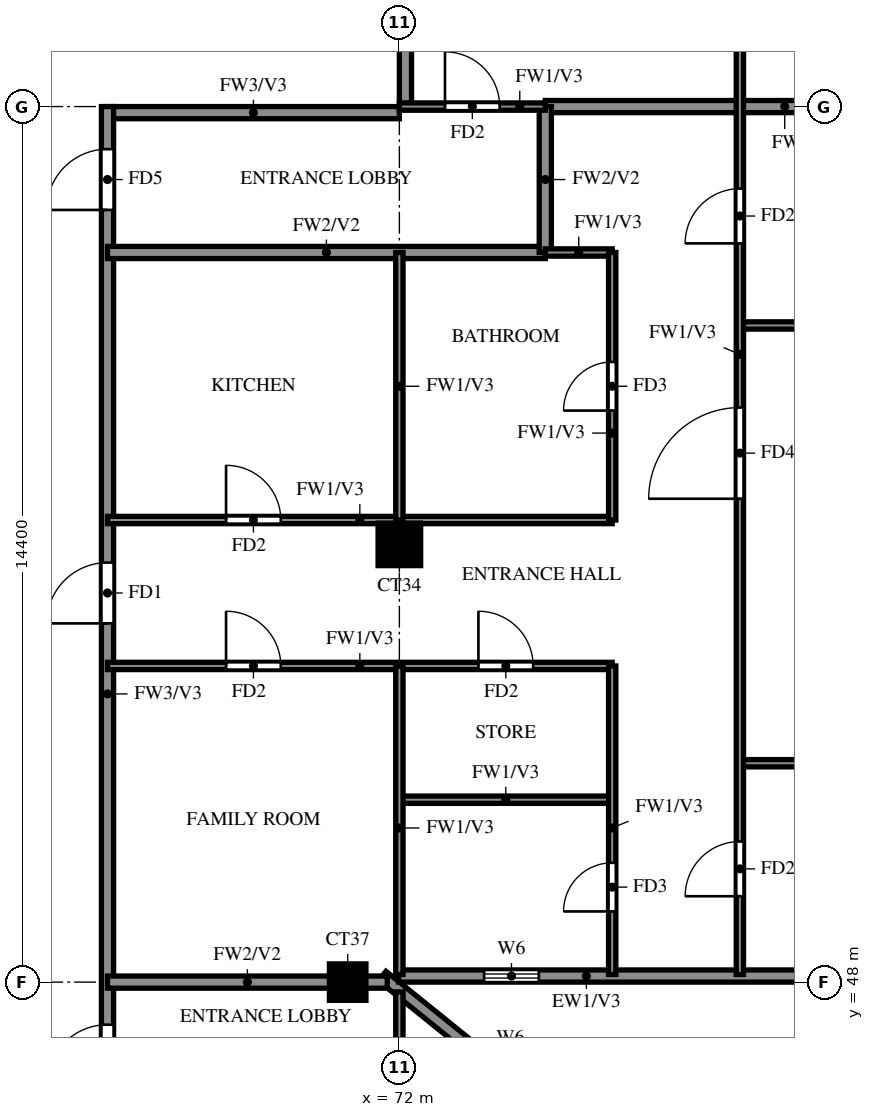
"""IFC4 building model, lengths in metres.
Left out: names, types, materials, properties, quantities, classifications, styles, units other than length and angle.
Written with IfcOpenShell. Run it as: python <this file> out.ifc"""

import sys

from ifc_helpers import new_model, si_unit, direction, frame, frame_2d, origin, origin_2d, place, context, subcontext, project, spatial, rectangle, extrude, source, transform, mapped, element, fill, save


model = new_model("IFC4")
c1 = context("Model", 3, precision=1e-05, world=origin(), true_north=direction((0.0, 1.0)))
c2 = subcontext(c1, "Body", "Model", "MODEL_VIEW")
j1 = project(units=[si_unit("LENGTHUNIT", "METRE"), si_unit("PLANEANGLEUNIT", "RADIAN")], contexts=[c1])
p1 = place(None, origin())
s1 = spatial("IfcSite", under=j1, at=p1, CompositionType="ELEMENT")
p2 = place(p1, origin())
s2 = spatial("IfcBuilding", under=s1, at=p2, CompositionType="ELEMENT")
p3 = place(p2, frame((0.0, 0.0, 264.0)))
s3 = spatial("IfcBuildingStorey", under=s2, at=p3, CompositionType="ELEMENT", Elevation=264.0)
m1 = source(origin(), c2, "Body", "SweptSolid", [
    extrude(rectangle(XDim=0.6, YDim=0.6, at=origin_2d()), origin(), (0.0, 0.0, 1.0), 3.22),
])
p4 = place(p3, frame((71.15, 48.0, 0.0), z_axis=(0.0, 0.0, 1.0), x_axis=(1.0, 0.0, 0.0)))
e1 = element("IfcColumn", 1, at=p4, inside=s3, PredefinedType="COLUMN", context=c2, shape_type="MappedRepresentation", body=[
    mapped(m1, transform((0.0, 0.0, 0.0))),
])
m2 = source(origin(), c2, "Body", "SweptSolid", [
    extrude(rectangle(XDim=0.7, YDim=0.7, at=origin_2d()), origin(), (0.0, 0.0, 1.0), 3.22),
])
p5 = place(p3, frame((72.0, 55.2, 0.0), z_axis=(0.0, 0.0, 1.0), x_axis=(1.0, 0.0, 0.0)))
e2 = element("IfcColumn", 2, at=p5, inside=s3, PredefinedType="COLUMN", context=c2, shape_type="MappedRepresentation", body=[
    mapped(m2, transform((0.0, 0.0, 0.0))),
])
p6 = place(p3, frame((81.907, 39.87, 0.0), z_axis=(0.0, 0.0, 1.0), x_axis=(-0.777936274417, 0.62834318087, 0.0)))
e3 = element("IfcWall", 3, at=p6, inside=s3, PredefinedType="SOLIDWALL", context=c2, shape_type="SweptSolid", body=[
    extrude(rectangle(XDim=13.099, YDim=0.2, at=frame_2d((6.549, 0.0))), origin(), (0.0, 0.0, 1.0), 3.22),
])
p7 = place(p6, frame((9.938, 0.0, 1.5)))
e4 = element("IfcOpeningElement", 4, at=p7, cuts=e3, PredefinedType="OPENING", context=c2, shape_type="SweptSolid", body=[
    extrude(rectangle(XDim=0.9, YDim=0.9, at=frame_2d((0.45, 0.45))), frame((0.0, 0.11, 0.0), z_axis=(0.0, -1.0, 0.0), x_axis=(1.0, 0.0, 0.0)), (0.0, 0.0, 1.0), 0.22),
])
p8 = place(p3, frame((71.987, 48.1, 0.0), z_axis=(0.0, 0.0, 1.0), x_axis=(1.0, 0.0, 0.0)))
e5 = element("IfcWall", 5, at=p8, inside=s3, PredefinedType="SOLIDWALL", context=c2, shape_type="SweptSolid", body=[
    extrude(rectangle(XDim=6.863, YDim=0.2, at=frame_2d((3.432, 0.0))), origin(), (0.0, 0.0, 1.0), 3.22),
])
p9 = place(p8, frame((1.406, 0.0, 1.5)))
e6 = element("IfcOpeningElement", 6, at=p9, cuts=e5, PredefinedType="OPENING", context=c2, shape_type="SweptSolid", body=[
    extrude(rectangle(XDim=0.9, YDim=0.9, at=frame_2d((0.45, 0.45))), frame((0.0, 0.11, 0.0), z_axis=(0.0, -1.0, 0.0), x_axis=(1.0, 0.0, 0.0)), (0.0, 0.0, 1.0), 0.22),
])
p10 = place(p3, frame((67.2, 62.3, 0.0), z_axis=(0.0, 0.0, 1.0), x_axis=(1.0, 0.0, 0.0)))
e7 = element("IfcWall", 7, at=p10, inside=s3, PredefinedType="SOLIDWALL", context=c2, shape_type="SweptSolid", body=[
    extrude(rectangle(XDim=4.8, YDim=0.2, at=frame_2d((2.4, 0.0))), origin(), (0.0, 0.0, 1.0), 3.22),
])
p11 = place(p3, frame((67.2, 45.6, 0.0), z_axis=(0.0, 0.0, 1.0), x_axis=(0.0, 1.0, 0.0)))
e8 = element("IfcWall", 8, at=p11, inside=s3, PredefinedType="SOLIDWALL", context=c2, shape_type="SweptSolid", body=[
    extrude(rectangle(XDim=16.8, YDim=0.2, at=frame_2d((8.4, 0.0))), origin(), (0.0, 0.0, 1.0), 3.22),
])
p12 = place(p11, frame((8.3, 0.0, 0.0)))
e9 = element("IfcOpeningElement", 9, at=p12, cuts=e8, PredefinedType="OPENING", context=c2, shape_type="SweptSolid", body=[
    extrude(rectangle(XDim=1.0, YDim=2.1, at=frame_2d((0.5, 1.05))), frame((0.0, 0.11, 0.0), z_axis=(0.0, -1.0, 0.0), x_axis=(1.0, 0.0, 0.0)), (0.0, 0.0, 1.0), 0.22),
])
p13 = place(p11, frame((15.1, 0.0, 0.0)))
e10 = element("IfcOpeningElement", 10, at=p13, cuts=e8, PredefinedType="OPENING", context=c2, shape_type="SweptSolid", body=[
    extrude(rectangle(XDim=1.0, YDim=2.1, at=frame_2d((0.5, 1.05))), frame((0.0, 0.11, 0.0), z_axis=(0.0, -1.0, 0.0), x_axis=(1.0, 0.0, 0.0)), (0.0, 0.0, 1.0), 0.22),
])
p14 = place(p11, frame((0.7, 0.0, 0.0)))
e11 = element("IfcOpeningElement", 11, at=p14, cuts=e8, PredefinedType="OPENING", context=c2, shape_type="SweptSolid", body=[
    extrude(rectangle(XDim=1.0, YDim=2.1, at=frame_2d((0.5, 1.05))), frame((0.0, 0.11, 0.0), z_axis=(0.0, -1.0, 0.0), x_axis=(1.0, 0.0, 0.0)), (0.0, 0.0, 1.0), 0.22),
])
p15 = place(p3, frame((72.1, 62.4, 0.0), z_axis=(0.0, 0.0, 1.0), x_axis=(0.0, 1.0, 0.0)))
e12 = element("IfcWall", 12, at=p15, inside=s3, PredefinedType="SOLIDWALL", context=c2, shape_type="SweptSolid", body=[
    extrude(rectangle(XDim=15.6, YDim=0.2, at=frame_2d((7.8, 0.0))), origin(), (0.0, 0.0, 1.0), 3.22),
])
p16 = place(p3, frame((67.2, 48.0, 0.0), z_axis=(0.0, 0.0, 1.0), x_axis=(1.0, 0.0, 0.0)))
e13 = element("IfcWall", 13, at=p16, inside=s3, PredefinedType="SOLIDWALL", context=c2, shape_type="SweptSolid", body=[
    extrude(rectangle(XDim=4.601, YDim=0.2, at=frame_2d((2.301, 0.0))), origin(), (0.0, 0.0, 1.0), 3.22),
])
p17 = place(p3, frame((67.2, 60.0, 0.0), z_axis=(0.0, 0.0, 1.0), x_axis=(1.0, 0.0, 0.0)))
e14 = element("IfcWall", 14, at=p17, inside=s3, PredefinedType="SOLIDWALL", context=c2, shape_type="SweptSolid", body=[
    extrude(rectangle(XDim=7.2, YDim=0.2, at=frame_2d((3.6, 0.0))), origin(), (0.0, 0.0, 1.0), 3.22),
])
p18 = place(p3, frame((74.4, 62.4, 0.0), z_axis=(0.0, 0.0, 1.0), x_axis=(1.0, 0.0, 0.0)))
e15 = element("IfcWall", 15, at=p18, inside=s3, PredefinedType="SOLIDWALL", context=c2, shape_type="SweptSolid", body=[
    extrude(rectangle(XDim=7.875, YDim=0.2, at=frame_2d((3.938, 0.0))), origin(), (0.0, 0.0, 1.0), 3.22),
])
p19 = place(p3, frame((74.4, 60.0, 0.0), z_axis=(0.0, 0.0, 1.0), x_axis=(0.0, 1.0, 0.0)))
e16 = element("IfcWall", 16, at=p19, inside=s3, PredefinedType="SOLIDWALL", context=c2, shape_type="SweptSolid", body=[
    extrude(rectangle(XDim=2.4, YDim=0.2, at=frame_2d((1.2, 0.0))), origin(), (0.0, 0.0, 1.0), 3.22),
])
p20 = place(p3, frame((72.0, 51.0, 0.0), z_axis=(0.0, 0.0, 1.0), x_axis=(1.0, 0.0, 0.0)))
e17 = element("IfcWall", 17, at=p20, inside=s3, PredefinedType="PARTITIONING", context=c2, shape_type="SweptSolid", body=[
    extrude(rectangle(XDim=3.5, YDim=0.12, at=frame_2d((1.75, 0.0))), origin(), (0.0, 0.0, 1.0), 3.22),
])
p21 = place(p3, frame((77.6, 51.6, 0.0), z_axis=(0.0, 0.0, 1.0), x_axis=(1.0, 0.0, 0.0)))
e18 = element("IfcWall", 18, at=p21, inside=s3, PredefinedType="PARTITIONING", context=c2, shape_type="SweptSolid", body=[
    extrude(rectangle(XDim=4.675, YDim=0.12, at=frame_2d((2.337, 0.0))), origin(), (0.0, 0.0, 1.0), 2.32),
])
p22 = place(p3, frame((67.2, 53.2, 0.0), z_axis=(0.0, 0.0, 1.0), x_axis=(1.0, 0.0, 0.0)))
e19 = element("IfcWall", 19, at=p22, inside=s3, PredefinedType="PARTITIONING", context=c2, shape_type="SweptSolid", body=[
    extrude(rectangle(XDim=8.3, YDim=0.12, at=frame_2d((4.15, 0.0))), origin(), (0.0, 0.0, 1.0), 3.22),
])
p23 = place(p22, frame((6.1, 0.0, 0.0)))
e20 = element("IfcOpeningElement", 20, at=p23, cuts=e19, PredefinedType="OPENING", context=c2, shape_type="SweptSolid", body=[
    extrude(rectangle(XDim=0.9, YDim=2.1, at=frame_2d((0.45, 1.05))), frame((0.0, 0.07, 0.0), z_axis=(0.0, -1.0, 0.0), x_axis=(1.0, 0.0, 0.0)), (0.0, 0.0, 1.0), 0.14),
])
p24 = place(p22, frame((1.95, 0.0, 0.0)))
e21 = element("IfcOpeningElement", 21, at=p24, cuts=e19, PredefinedType="OPENING", context=c2, shape_type="SweptSolid", body=[
    extrude(rectangle(XDim=0.9, YDim=2.1, at=frame_2d((0.45, 1.05))), frame((0.0, 0.07, 0.0), z_axis=(0.0, -1.0, 0.0), x_axis=(1.0, 0.0, 0.0)), (0.0, 0.0, 1.0), 0.14),
])
p25 = place(p3, frame((67.2, 55.6, 0.0), z_axis=(0.0, 0.0, 1.0), x_axis=(1.0, 0.0, 0.0)))
e22 = element("IfcWall", 22, at=p25, inside=s3, PredefinedType="PARTITIONING", context=c2, shape_type="SweptSolid", body=[
    extrude(rectangle(XDim=8.3, YDim=0.12, at=frame_2d((4.15, 0.0))), origin(), (0.0, 0.0, 1.0), 3.22),
])
p26 = place(p25, frame((1.95, 0.0, 0.0)))
e23 = element("IfcOpeningElement", 23, at=p26, cuts=e22, PredefinedType="OPENING", context=c2, shape_type="SweptSolid", body=[
    extrude(rectangle(XDim=0.9, YDim=2.1, at=frame_2d((0.45, 1.05))), frame((0.0, 0.07, 0.0), z_axis=(0.0, -1.0, 0.0), x_axis=(1.0, 0.0, 0.0)), (0.0, 0.0, 1.0), 0.14),
])
p27 = place(p3, frame((77.6, 58.8, 0.0), z_axis=(0.0, 0.0, 1.0), x_axis=(1.0, 0.0, 0.0)))
e24 = element("IfcWall", 24, at=p27, inside=s3, PredefinedType="PARTITIONING", context=c2, shape_type="SweptSolid", body=[
    extrude(rectangle(XDim=4.675, YDim=0.12, at=frame_2d((2.337, 0.0))), origin(), (0.0, 0.0, 1.0), 2.32),
])
p28 = place(p3, frame((74.4, 60.0, 0.0), z_axis=(0.0, 0.0, 1.0), x_axis=(1.0, 0.0, 0.0)))
e25 = element("IfcWall", 25, at=p28, inside=s3, PredefinedType="PARTITIONING", context=c2, shape_type="SweptSolid", body=[
    extrude(rectangle(XDim=1.1, YDim=0.12, at=frame_2d((0.55, 0.0))), origin(), (0.0, 0.0, 1.0), 3.22),
])
p29 = place(p3, frame((72.0, 62.4, 0.0), z_axis=(0.0, 0.0, 1.0), x_axis=(1.0, 0.0, 0.0)))
e26 = element("IfcWall", 26, at=p29, inside=s3, PredefinedType="PARTITIONING", context=c2, shape_type="SweptSolid", body=[
    extrude(rectangle(XDim=2.4, YDim=0.12, at=frame_2d((1.2, 0.0))), origin(), (0.0, 0.0, 1.0), 3.22),
])
p30 = place(p29, frame((0.75, 0.0, 0.0)))
e27 = element("IfcOpeningElement", 27, at=p30, cuts=e26, PredefinedType="OPENING", context=c2, shape_type="SweptSolid", body=[
    extrude(rectangle(XDim=0.9, YDim=2.1, at=frame_2d((0.45, 1.05))), frame((0.0, 0.07, 0.0), z_axis=(0.0, -1.0, 0.0), x_axis=(1.0, 0.0, 0.0)), (0.0, 0.0, 1.0), 0.14),
])
p31 = place(p3, frame((72.0, 39.725, 0.0), z_axis=(0.0, 0.0, 1.0), x_axis=(0.0, 1.0, 0.0)))
e28 = element("IfcWall", 28, at=p31, inside=s3, PredefinedType="PARTITIONING", context=c2, shape_type="SweptSolid", body=[
    extrude(rectangle(XDim=8.114, YDim=0.12, at=frame_2d((4.057, 0.0))), origin(), (0.0, 0.0, 1.0), 2.32),
])
p32 = place(p31, frame((1.788, 0.0, 0.0)))
e29 = element("IfcOpeningElement", 29, at=p32, cuts=e28, PredefinedType="OPENING", context=c2, shape_type="SweptSolid", body=[
    extrude(rectangle(XDim=1.5, YDim=2.1, at=frame_2d((0.75, 1.05))), frame((0.0, 0.07, 0.0), z_axis=(0.0, -1.0, 0.0), x_axis=(1.0, 0.0, 0.0)), (0.0, 0.0, 1.0), 0.14),
])
p33 = place(p31, frame((4.575, 0.0, 0.0)))
e30 = element("IfcOpeningElement", 30, at=p33, cuts=e28, PredefinedType="OPENING", context=c2, shape_type="SweptSolid", body=[
    extrude(rectangle(XDim=0.8, YDim=2.1, at=frame_2d((0.4, 1.05))), frame((0.0, 0.07, 0.0), z_axis=(0.0, -1.0, 0.0), x_axis=(1.0, 0.0, 0.0)), (0.0, 0.0, 1.0), 0.14),
])
p34 = place(p3, frame((72.0, 48.125, 0.0), z_axis=(0.0, 0.0, 1.0), x_axis=(0.0, 1.0, 0.0)))
e31 = element("IfcWall", 31, at=p34, inside=s3, PredefinedType="PARTITIONING", context=c2, shape_type="SweptSolid", body=[
    extrude(rectangle(XDim=5.075, YDim=0.12, at=frame_2d((2.538, 0.0))), origin(), (0.0, 0.0, 1.0), 3.22),
])
p35 = place(p3, frame((72.0, 55.6, 0.0), z_axis=(0.0, 0.0, 1.0), x_axis=(0.0, 1.0, 0.0)))
e32 = element("IfcWall", 32, at=p35, inside=s3, PredefinedType="PARTITIONING", context=c2, shape_type="SweptSolid", body=[
    extrude(rectangle(XDim=4.4, YDim=0.12, at=frame_2d((2.2, 0.0))), origin(), (0.0, 0.0, 1.0), 3.22),
])
p36 = place(p3, frame((75.5, 48.125, 0.0), z_axis=(0.0, 0.0, 1.0), x_axis=(0.0, 1.0, 0.0)))
e33 = element("IfcWall", 33, at=p36, inside=s3, PredefinedType="PARTITIONING", context=c2, shape_type="SweptSolid", body=[
    extrude(rectangle(XDim=5.075, YDim=0.12, at=frame_2d((2.538, 0.0))), origin(), (0.0, 0.0, 1.0), 3.22),
])
p37 = place(p36, frame((1.038, 0.0, 0.0)))
e34 = element("IfcOpeningElement", 34, at=p37, cuts=e33, PredefinedType="OPENING", context=c2, shape_type="SweptSolid", body=[
    extrude(rectangle(XDim=0.8, YDim=2.1, at=frame_2d((0.4, 1.05))), frame((0.0, 0.07, 0.0), z_axis=(0.0, -1.0, 0.0), x_axis=(1.0, 0.0, 0.0)), (0.0, 0.0, 1.0), 0.14),
])
p38 = place(p3, frame((75.5, 55.6, 0.0), z_axis=(0.0, 0.0, 1.0), x_axis=(0.0, 1.0, 0.0)))
e35 = element("IfcWall", 35, at=p38, inside=s3, PredefinedType="PARTITIONING", context=c2, shape_type="SweptSolid", body=[
    extrude(rectangle(XDim=4.4, YDim=0.12, at=frame_2d((2.2, 0.0))), origin(), (0.0, 0.0, 1.0), 3.22),
])
p39 = place(p38, frame((1.8, 0.0, 0.0)))
e36 = element("IfcOpeningElement", 36, at=p39, cuts=e35, PredefinedType="OPENING", context=c2, shape_type="SweptSolid", body=[
    extrude(rectangle(XDim=0.8, YDim=2.1, at=frame_2d((0.4, 1.05))), frame((0.0, 0.07, 0.0), z_axis=(0.0, -1.0, 0.0), x_axis=(1.0, 0.0, 0.0)), (0.0, 0.0, 1.0), 0.14),
])
p40 = place(p3, frame((77.6, 48.125, 0.0), z_axis=(0.0, 0.0, 1.0), x_axis=(0.0, 1.0, 0.0)))
e37 = element("IfcWall", 37, at=p40, inside=s3, PredefinedType="PARTITIONING", context=c2, shape_type="SweptSolid", body=[
    extrude(rectangle(XDim=21.475, YDim=0.12, at=frame_2d((10.738, 0.0))), origin(), (0.0, 0.0, 1.0), 3.22),
])
p41 = place(p40, frame((1.288, 0.0, 0.0)))
e38 = element("IfcOpeningElement", 38, at=p41, cuts=e37, PredefinedType="OPENING", context=c2, shape_type="SweptSolid", body=[
    extrude(rectangle(XDim=0.9, YDim=2.1, at=frame_2d((0.45, 1.05))), frame((0.0, 0.07, 0.0), z_axis=(0.0, -1.0, 0.0), x_axis=(1.0, 0.0, 0.0)), (0.0, 0.0, 1.0), 0.14),
])
p42 = place(p40, frame((7.825, 0.0, 0.0)))
e39 = element("IfcOpeningElement", 39, at=p42, cuts=e37, PredefinedType="OPENING", context=c2, shape_type="SweptSolid", body=[
    extrude(rectangle(XDim=1.5, YDim=2.1, at=frame_2d((0.75, 1.05))), frame((0.0, 0.07, 0.0), z_axis=(0.0, -1.0, 0.0), x_axis=(1.0, 0.0, 0.0)), (0.0, 0.0, 1.0), 0.14),
])
p43 = place(p40, frame((12.025, 0.0, 0.0)))
e40 = element("IfcOpeningElement", 40, at=p43, cuts=e37, PredefinedType="OPENING", context=c2, shape_type="SweptSolid", body=[
    extrude(rectangle(XDim=0.9, YDim=2.1, at=frame_2d((0.45, 1.05))), frame((0.0, 0.07, 0.0), z_axis=(0.0, -1.0, 0.0), x_axis=(1.0, 0.0, 0.0)), (0.0, 0.0, 1.0), 0.14),
])
p44 = place(p40, frame((15.625, 0.0, 0.0)))
e41 = element("IfcOpeningElement", 41, at=p44, cuts=e37, PredefinedType="OPENING", context=c2, shape_type="SweptSolid", body=[
    extrude(rectangle(XDim=0.9, YDim=2.1, at=frame_2d((0.45, 1.05))), frame((0.0, 0.07, 0.0), z_axis=(0.0, -1.0, 0.0), x_axis=(1.0, 0.0, 0.0)), (0.0, 0.0, 1.0), 0.14),
])
p45 = place(p40, frame((19.225, 0.0, 0.0)))
e42 = element("IfcOpeningElement", 42, at=p45, cuts=e37, PredefinedType="OPENING", context=c2, shape_type="SweptSolid", body=[
    extrude(rectangle(XDim=0.9, YDim=2.1, at=frame_2d((0.45, 1.05))), frame((0.0, 0.07, 0.0), z_axis=(0.0, -1.0, 0.0), x_axis=(1.0, 0.0, 0.0)), (0.0, 0.0, 1.0), 0.14),
])
p46 = place(p9, origin())
e43 = element("IfcWindow", 43, at=p46, inside=s3, PartitioningType="SINGLE_PANEL", PredefinedType="WINDOW", context=c2, shape_type="SweptSolid", body=[
    extrude(rectangle(XDim=0.9, YDim=0.9, at=frame_2d((0.45, 0.45))), frame((0.0, 0.03, 0.0), z_axis=(0.0, -1.0, 0.0), x_axis=(1.0, 0.0, 0.0)), (0.0, 0.0, 1.0), 0.06),
])
fill(e6, e43)
p47 = place(p12, origin())
e44 = element("IfcDoor", 44, at=p47, inside=s3, OperationType="SINGLE_SWING_LEFT", PredefinedType="DOOR", context=c2, shape_type="SweptSolid", body=[
    extrude(rectangle(XDim=1.0, YDim=2.1, at=frame_2d((0.5, 1.05))), frame((0.0, 0.025, 0.0), z_axis=(0.0, -1.0, 0.0), x_axis=(1.0, 0.0, 0.0)), (0.0, 0.0, 1.0), 0.05),
])
fill(e9, e44)
p48 = place(p41, origin())
e45 = element("IfcDoor", 45, at=p48, inside=s3, OperationType="SINGLE_SWING_RIGHT", PredefinedType="DOOR", context=c2, shape_type="SweptSolid", body=[
    extrude(rectangle(XDim=0.9, YDim=2.1, at=frame_2d((0.45, 1.05))), frame((0.0, 0.025, 0.0), z_axis=(0.0, -1.0, 0.0), x_axis=(1.0, 0.0, 0.0)), (0.0, 0.0, 1.0), 0.05),
])
fill(e38, e45)
p49 = place(p42, origin())
e46 = element("IfcDoor", 46, at=p49, inside=s3, OperationType="SINGLE_SWING_RIGHT", PredefinedType="DOOR", context=c2, shape_type="SweptSolid", body=[
    extrude(rectangle(XDim=1.5, YDim=2.1, at=frame_2d((0.75, 1.05))), frame((0.0, 0.025, 0.0), z_axis=(0.0, -1.0, 0.0), x_axis=(1.0, 0.0, 0.0)), (0.0, 0.0, 1.0), 0.05),
])
fill(e39, e46)
p50 = place(p43, origin())
e47 = element("IfcDoor", 47, at=p50, inside=s3, OperationType="SINGLE_SWING_LEFT", PredefinedType="DOOR", context=c2, shape_type="SweptSolid", body=[
    extrude(rectangle(XDim=0.9, YDim=2.1, at=frame_2d((0.45, 1.05))), frame((0.0, 0.025, 0.0), z_axis=(0.0, -1.0, 0.0), x_axis=(1.0, 0.0, 0.0)), (0.0, 0.0, 1.0), 0.05),
])
fill(e40, e47)
p51 = place(p37, origin())
e48 = element("IfcDoor", 48, at=p51, inside=s3, OperationType="SINGLE_SWING_RIGHT", PredefinedType="DOOR", context=c2, shape_type="SweptSolid", body=[
    extrude(rectangle(XDim=0.8, YDim=2.1, at=frame_2d((0.4, 1.05))), frame((0.0, 0.025, 0.0), z_axis=(0.0, -1.0, 0.0), x_axis=(1.0, 0.0, 0.0)), (0.0, 0.0, 1.0), 0.05),
])
fill(e34, e48)
p52 = place(p23, origin())
e49 = element("IfcDoor", 49, at=p52, inside=s3, OperationType="SINGLE_SWING_LEFT", PredefinedType="DOOR", context=c2, shape_type="SweptSolid", body=[
    extrude(rectangle(XDim=0.9, YDim=2.1, at=frame_2d((0.45, 1.05))), frame((0.0, 0.025, 0.0), z_axis=(0.0, -1.0, 0.0), x_axis=(1.0, 0.0, 0.0)), (0.0, 0.0, 1.0), 0.05),
])
fill(e20, e49)
p53 = place(p39, origin())
e50 = element("IfcDoor", 50, at=p53, inside=s3, OperationType="SINGLE_SWING_LEFT", PredefinedType="DOOR", context=c2, shape_type="SweptSolid", body=[
    extrude(rectangle(XDim=0.8, YDim=2.1, at=frame_2d((0.4, 1.05))), frame((0.0, 0.025, 0.0), z_axis=(0.0, -1.0, 0.0), x_axis=(1.0, 0.0, 0.0)), (0.0, 0.0, 1.0), 0.05),
])
fill(e36, e50)
p54 = place(p24, origin())
e51 = element("IfcDoor", 51, at=p54, inside=s3, OperationType="SINGLE_SWING_RIGHT", PredefinedType="DOOR", context=c2, shape_type="SweptSolid", body=[
    extrude(rectangle(XDim=0.9, YDim=2.1, at=frame_2d((0.45, 1.05))), frame((0.0, 0.025, 0.0), z_axis=(0.0, -1.0, 0.0), x_axis=(1.0, 0.0, 0.0)), (0.0, 0.0, 1.0), 0.05),
])
fill(e21, e51)
p55 = place(p26, origin())
e52 = element("IfcDoor", 52, at=p55, inside=s3, OperationType="SINGLE_SWING_LEFT", PredefinedType="DOOR", context=c2, shape_type="SweptSolid", body=[
    extrude(rectangle(XDim=0.9, YDim=2.1, at=frame_2d((0.45, 1.05))), frame((0.0, 0.025, 0.0), z_axis=(0.0, -1.0, 0.0), x_axis=(1.0, 0.0, 0.0)), (0.0, 0.0, 1.0), 0.05),
])
fill(e23, e52)
p56 = place(p30, origin())
e53 = element("IfcDoor", 53, at=p56, inside=s3, OperationType="SINGLE_SWING_LEFT", PredefinedType="DOOR", context=c2, shape_type="SweptSolid", body=[
    extrude(rectangle(XDim=0.9, YDim=2.1, at=frame_2d((0.45, 1.05))), frame((0.0, 0.025, 0.0), z_axis=(0.0, -1.0, 0.0), x_axis=(1.0, 0.0, 0.0)), (0.0, 0.0, 1.0), 0.05),
])
fill(e27, e53)
p57 = place(p13, origin())
e54 = element("IfcDoor", 54, at=p57, inside=s3, OperationType="SINGLE_SWING_LEFT", PredefinedType="DOOR", context=c2, shape_type="SweptSolid", body=[
    extrude(rectangle(XDim=1.0, YDim=2.1, at=frame_2d((0.5, 1.05))), frame((0.0, 0.025, 0.0), z_axis=(0.0, -1.0, 0.0), x_axis=(1.0, 0.0, 0.0)), (0.0, 0.0, 1.0), 0.05),
])
fill(e10, e54)
p58 = place(p14, origin())
e55 = element("IfcDoor", 55, at=p58, inside=s3, OperationType="SINGLE_SWING_LEFT", PredefinedType="DOOR", context=c2, shape_type="SweptSolid", body=[
    extrude(rectangle(XDim=1.0, YDim=2.1, at=frame_2d((0.5, 1.05))), frame((0.0, 0.025, 0.0), z_axis=(0.0, -1.0, 0.0), x_axis=(1.0, 0.0, 0.0)), (0.0, 0.0, 1.0), 0.05),
])
fill(e11, e55)
save(model, sys.argv[1])
